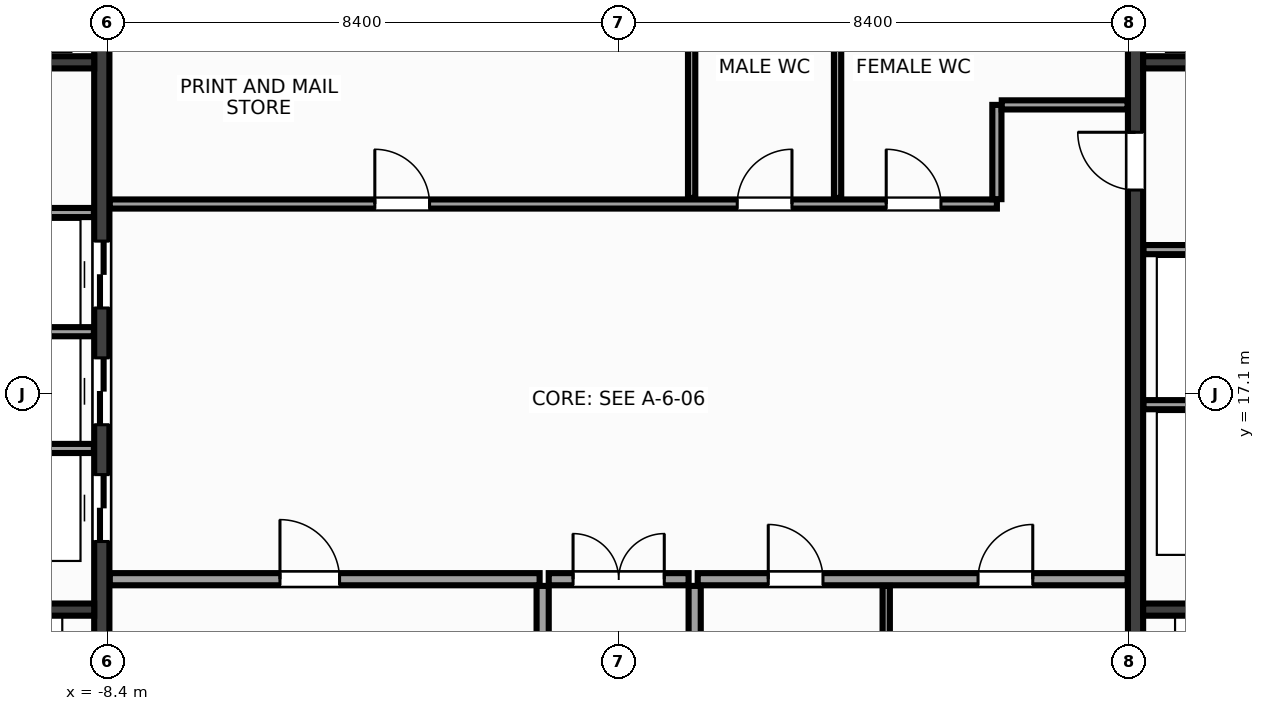
"""IFC4 building model, lengths in metres.
Left out: names, types, materials, properties, quantities, classifications, styles, units other than length and angle.
Written with IfcOpenShell. Run it as: python <this file> out.ifc"""

import sys

from ifc_helpers import new_model, si_unit, direction, frame, frame_2d, origin, place, context, subcontext, project, spatial, rectangle, extrude, source, transform, mapped, element, fill, save


model = new_model("IFC4")
c1 = context("Model", 3, precision=1e-05, world=origin(), true_north=direction((0.0, 1.0)))
c2 = subcontext(c1, "Body", "Model", "MODEL_VIEW")
j1 = project(units=[si_unit("LENGTHUNIT", "METRE"), si_unit("PLANEANGLEUNIT", "RADIAN")], contexts=[c1])
p1 = place(None, origin())
s1 = spatial("IfcSite", under=j1, at=p1, CompositionType="ELEMENT")
p2 = place(p1, origin())
s2 = spatial("IfcBuilding", under=s1, at=p2, CompositionType="ELEMENT")
p3 = place(p2, frame((0.0, 0.0, 243.2)))
s3 = spatial("IfcBuildingStorey", under=s2, at=p3, CompositionType="ELEMENT", Elevation=243.2)
m1 = source(origin(), c2, "Body", "SweptSolid", [
    extrude(rectangle(XDim=13.1, YDim=0.25, at=frame_2d((6.55, 0.0))), origin(), (0.0, 0.0, 1.0), 3.6),
])
p4 = place(p3, frame((-8.5, 10.45, 0.0), z_axis=(0.0, 0.0, 1.0), x_axis=(0.0, 1.0, 0.0)))
e1 = element("IfcWall", 1, at=p4, inside=s3, PredefinedType="SHEAR", context=c2, shape_type="MappedRepresentation", body=[
    mapped(m1, transform((0.0, 0.0, 0.0), x_axis=(1.0, 0.0, 0.0), y_axis=(0.0, 1.0, 0.0), z_axis=(0.0, 0.0, 1.0), scale=1.0)),
])
p5 = place(p4, frame((4.22, 0.0, 0.0)))
e2 = element("IfcOpeningElement", 2, at=p5, cuts=e1, PredefinedType="OPENING", context=c2, shape_type="SweptSolid", body=[
    extrude(rectangle(XDim=1.1, YDim=2.15, at=frame_2d((0.55, 1.075))), frame((0.0, 0.137, 0.0), z_axis=(0.0, -1.0, 0.0), x_axis=(1.0, 0.0, 0.0)), (0.0, 0.0, 1.0), 0.274),
])
p6 = place(p4, frame((6.14, 0.0, 0.0)))
e3 = element("IfcOpeningElement", 3, at=p6, cuts=e1, PredefinedType="OPENING", context=c2, shape_type="SweptSolid", body=[
    extrude(rectangle(XDim=1.1, YDim=2.15, at=frame_2d((0.55, 1.075))), frame((0.0, 0.137, 0.0), z_axis=(0.0, -1.0, 0.0), x_axis=(1.0, 0.0, 0.0)), (0.0, 0.0, 1.0), 0.274),
])
p7 = place(p4, frame((8.06, 0.0, 0.0)))
e4 = element("IfcOpeningElement", 4, at=p7, cuts=e1, PredefinedType="OPENING", context=c2, shape_type="SweptSolid", body=[
    extrude(rectangle(XDim=1.1, YDim=2.15, at=frame_2d((0.55, 1.075))), frame((0.0, 0.137, 0.0), z_axis=(0.0, -1.0, 0.0), x_axis=(1.0, 0.0, 0.0)), (0.0, 0.0, 1.0), 0.274),
])
p8 = place(p3, frame((8.5, 10.45, 0.0), z_axis=(0.0, 0.0, 1.0), x_axis=(0.0, 1.0, 0.0)))
e5 = element("IfcWall", 5, at=p8, inside=s3, PredefinedType="SHEAR", context=c2, shape_type="MappedRepresentation", body=[
    mapped(m1, transform((0.0, 0.0, 0.0), x_axis=(1.0, 0.0, 0.0), y_axis=(0.0, 1.0, 0.0), z_axis=(0.0, 0.0, 1.0), scale=1.0)),
])
p9 = place(p8, frame((10.0, 0.0, 0.0)))
e6 = element("IfcOpeningElement", 6, at=p9, cuts=e5, PredefinedType="OPENING", context=c2, shape_type="SweptSolid", body=[
    extrude(rectangle(XDim=0.95, YDim=2.15, at=frame_2d((0.475, 1.075))), frame((0.0, 0.137, 0.0), z_axis=(0.0, -1.0, 0.0), x_axis=(1.0, 0.0, 0.0)), (0.0, 0.0, 1.0), 0.274),
])
m2 = source(origin(), c2, "Body", "SweptSolid", [
    extrude(rectangle(XDim=2.825, YDim=0.2, at=frame_2d((1.413, 0.0))), origin(), (0.0, 0.0, 1.0), 3.6),
])
for number, where, z_axis, x_axis in (
    (7, (-11.45, 13.55, 0.0), (0.0, 0.0, 1.0), (1.0, 0.0, 0.0)),
    (8, (8.625, 13.55, 0.0), (0.0, 0.0, 1.0), (1.0, 0.0, 0.0)),
):
    element("IfcWall", number, at=place(p3, frame(where, z_axis=z_axis, x_axis=x_axis)), inside=s3, PredefinedType="SHEAR", context=c2, shape_type="MappedRepresentation", body=[
        mapped(m2, transform((0.0, 0.0, 0.0), x_axis=(1.0, 0.0, 0.0), y_axis=(0.0, 1.0, 0.0), z_axis=(0.0, 0.0, 1.0), scale=1.0)),
    ])
m3 = source(origin(), c2, "Body", "SweptSolid", [
    extrude(rectangle(XDim=3.02, YDim=0.2, at=frame_2d((1.51, 0.0))), origin(), (0.0, 0.0, 1.0), 3.6),
])
for number, where, z_axis, x_axis in (
    (9, (-11.645, 22.55, 0.0), (0.0, 0.0, 1.0), (1.0, 0.0, 0.0)),
    (10, (8.625, 22.55, 0.0), (0.0, 0.0, 1.0), (1.0, 0.0, 0.0)),
):
    element("IfcWall", number, at=place(p3, frame(where, z_axis=z_axis, x_axis=x_axis)), inside=s3, PredefinedType="SHEAR", context=c2, shape_type="MappedRepresentation", body=[
        mapped(m3, transform((0.0, 0.0, 0.0), x_axis=(1.0, 0.0, 0.0), y_axis=(0.0, 1.0, 0.0), z_axis=(0.0, 0.0, 1.0), scale=1.0)),
    ])
m4 = source(origin(), c2, "Body", "SweptSolid", [
    extrude(rectangle(XDim=3.01, YDim=0.15, at=frame_2d((1.505, 0.0))), origin(), (0.0, 0.0, 1.0), 3.37),
])
for number, where, z_axis, x_axis in (
    (11, (-11.64, 16.2, 0.0), (0.0, 0.0, 1.0), (1.0, 0.0, 0.0)),
    (12, (-11.64, 18.12, 0.0), (0.0, 0.0, 1.0), (1.0, 0.0, 0.0)),
    (13, (-11.64, 20.08, 0.0), (0.0, 0.0, 1.0), (1.0, 0.0, 0.0)),
    (14, (8.63, 16.92, 0.0), (0.0, 0.0, 1.0), (1.0, 0.0, 0.0)),
    (15, (8.63, 19.47, 0.0), (0.0, 0.0, 1.0), (1.0, 0.0, 0.0)),
):
    element("IfcWall", number, at=place(p3, frame(where, z_axis=z_axis, x_axis=x_axis)), inside=s3, PredefinedType="PARTITIONING", context=c2, shape_type="MappedRepresentation", body=[
        mapped(m4, transform((0.0, 0.0, 0.0), x_axis=(1.0, 0.0, 0.0), y_axis=(0.0, 1.0, 0.0), z_axis=(0.0, 0.0, 1.0), scale=1.0)),
    ])
m5 = source(origin(), c2, "Body", "SweptSolid", [
    extrude(rectangle(XDim=7.07, YDim=0.2, at=frame_2d((3.535, 0.0))), origin(), (0.0, 0.0, 1.0), 3.37),
])
p10 = place(p3, frame((-8.37, 14.05, 0.0), z_axis=(0.0, 0.0, 1.0), x_axis=(1.0, 0.0, 0.0)))
e16 = element("IfcWall", 16, at=p10, inside=s3, PredefinedType="PARTITIONING", context=c2, shape_type="MappedRepresentation", body=[
    mapped(m5, transform((0.0, 0.0, 0.0), x_axis=(1.0, 0.0, 0.0), y_axis=(0.0, 1.0, 0.0), z_axis=(0.0, 0.0, 1.0), scale=1.0)),
])
p11 = place(p10, frame((2.8, 0.0, 0.0)))
e17 = element("IfcOpeningElement", 17, at=p11, cuts=e16, PredefinedType="OPENING", context=c2, shape_type="SweptSolid", body=[
    extrude(rectangle(XDim=0.98, YDim=2.15, at=frame_2d((0.49, 1.075))), frame((0.0, 0.112, 0.0), z_axis=(0.0, -1.0, 0.0), x_axis=(1.0, 0.0, 0.0)), (0.0, 0.0, 1.0), 0.224),
])
p12 = place(p3, frame((1.3, 14.05, 0.0), z_axis=(0.0, 0.0, 1.0), x_axis=(1.0, 0.0, 0.0)))
e18 = element("IfcWall", 18, at=p12, inside=s3, PredefinedType="PARTITIONING", context=c2, shape_type="MappedRepresentation", body=[
    mapped(m5, transform((0.0, 0.0, 0.0), x_axis=(1.0, 0.0, 0.0), y_axis=(0.0, 1.0, 0.0), z_axis=(0.0, 0.0, 1.0), scale=1.0)),
])
p13 = place(p12, frame((1.16, 0.0, 0.0)))
e19 = element("IfcOpeningElement", 19, at=p13, cuts=e18, PredefinedType="OPENING", context=c2, shape_type="SweptSolid", body=[
    extrude(rectangle(XDim=0.9, YDim=2.15, at=frame_2d((0.45, 1.075))), frame((0.0, 0.112, 0.0), z_axis=(0.0, -1.0, 0.0), x_axis=(1.0, 0.0, 0.0)), (0.0, 0.0, 1.0), 0.224),
])
p14 = place(p12, frame((4.61, 0.0, 0.0)))
e20 = element("IfcOpeningElement", 20, at=p14, cuts=e18, PredefinedType="OPENING", context=c2, shape_type="SweptSolid", body=[
    extrude(rectangle(XDim=0.9, YDim=2.15, at=frame_2d((0.45, 1.075))), frame((0.0, 0.112, 0.0), z_axis=(0.0, -1.0, 0.0), x_axis=(1.0, 0.0, 0.0)), (0.0, 0.0, 1.0), 0.224),
])
m6 = source(origin(), c2, "Body", "SweptSolid", [
    extrude(rectangle(XDim=3.49, YDim=0.2, at=frame_2d((1.745, 0.0))), origin(), (0.0, 0.0, 1.0), 3.37),
])
for number, where, z_axis, x_axis in (
    (21, (-1.25, 10.45, 0.0), (0.0, 0.0, 1.0), (0.0, 1.0, 0.0)),
    (22, (1.25, 10.45, 0.0), (0.0, 0.0, 1.0), (0.0, 1.0, 0.0)),
):
    element("IfcWall", number, at=place(p3, frame(where, z_axis=z_axis, x_axis=x_axis)), inside=s3, PredefinedType="PARTITIONING", context=c2, shape_type="MappedRepresentation", body=[
        mapped(m6, transform((0.0, 0.0, 0.0), x_axis=(1.0, 0.0, 0.0), y_axis=(0.0, 1.0, 0.0), z_axis=(0.0, 0.0, 1.0), scale=1.0)),
    ])
m7 = source(origin(), c2, "Body", "SweptSolid", [
    extrude(rectangle(XDim=2.3, YDim=0.2, at=frame_2d((1.15, 0.0))), origin(), (0.0, 0.0, 1.0), 3.37),
])
p15 = place(p3, frame((-1.15, 14.05, 0.0), z_axis=(0.0, 0.0, 1.0), x_axis=(1.0, 0.0, 0.0)))
e23 = element("IfcWall", 23, at=p15, inside=s3, PredefinedType="PARTITIONING", context=c2, shape_type="MappedRepresentation", body=[
    mapped(m7, transform((0.0, 0.0, 0.0), x_axis=(1.0, 0.0, 0.0), y_axis=(0.0, 1.0, 0.0), z_axis=(0.0, 0.0, 1.0), scale=1.0)),
])
p16 = place(p15, frame((0.4, 0.0, 0.0)))
e24 = element("IfcOpeningElement", 24, at=p16, cuts=e23, PredefinedType="OPENING", context=c2, shape_type="SweptSolid", body=[
    extrude(rectangle(XDim=1.5, YDim=2.2, at=frame_2d((0.75, 1.1))), frame((0.0, 0.112, 0.0), z_axis=(0.0, -1.0, 0.0), x_axis=(1.0, 0.0, 0.0)), (0.0, 0.0, 1.0), 0.224),
])
m8 = source(origin(), c2, "Body", "SweptSolid", [
    extrude(rectangle(XDim=14.59, YDim=0.15, at=frame_2d((7.295, 0.0))), origin(), (0.0, 0.0, 1.0), 3.37),
])
p17 = place(p3, frame((-8.37, 20.22, 0.0), z_axis=(0.0, 0.0, 1.0), x_axis=(1.0, 0.0, 0.0)))
e25 = element("IfcWall", 25, at=p17, inside=s3, PredefinedType="PARTITIONING", context=c2, shape_type="MappedRepresentation", body=[
    mapped(m8, transform((0.0, 0.0, 0.0), x_axis=(1.0, 0.0, 0.0), y_axis=(0.0, 1.0, 0.0), z_axis=(0.0, 0.0, 1.0), scale=1.0)),
])
p18 = place(p17, frame((4.36, 0.0, 0.0)))
e26 = element("IfcOpeningElement", 26, at=p18, cuts=e25, PredefinedType="OPENING", context=c2, shape_type="SweptSolid", body=[
    extrude(rectangle(XDim=0.9, YDim=2.15, at=frame_2d((0.45, 1.075))), frame((0.0, 0.087, 0.0), z_axis=(0.0, -1.0, 0.0), x_axis=(1.0, 0.0, 0.0)), (0.0, 0.0, 1.0), 0.174),
])
p19 = place(p17, frame((10.32, 0.0, 0.0)))
e27 = element("IfcOpeningElement", 27, at=p19, cuts=e25, PredefinedType="OPENING", context=c2, shape_type="SweptSolid", body=[
    extrude(rectangle(XDim=0.9, YDim=2.15, at=frame_2d((0.45, 1.075))), frame((0.0, 0.087, 0.0), z_axis=(0.0, -1.0, 0.0), x_axis=(1.0, 0.0, 0.0)), (0.0, 0.0, 1.0), 0.174),
])
p20 = place(p17, frame((12.77, 0.0, 0.0)))
e28 = element("IfcOpeningElement", 28, at=p20, cuts=e25, PredefinedType="OPENING", context=c2, shape_type="SweptSolid", body=[
    extrude(rectangle(XDim=0.9, YDim=2.15, at=frame_2d((0.45, 1.075))), frame((0.0, 0.087, 0.0), z_axis=(0.0, -1.0, 0.0), x_axis=(1.0, 0.0, 0.0)), (0.0, 0.0, 1.0), 0.174),
])
m9 = source(origin(), c2, "Body", "SweptSolid", [
    extrude(rectangle(XDim=1.55, YDim=0.15, at=frame_2d((0.775, 0.0))), origin(), (0.0, 0.0, 1.0), 3.37),
])
p21 = place(p3, frame((6.22, 20.3, 0.0), z_axis=(0.0, 0.0, 1.0), x_axis=(0.0, 1.0, 0.0)))
e29 = element("IfcWall", 29, at=p21, inside=s3, PredefinedType="PARTITIONING", context=c2, shape_type="MappedRepresentation", body=[
    mapped(m9, transform((0.0, 0.0, 0.0), x_axis=(1.0, 0.0, 0.0), y_axis=(0.0, 1.0, 0.0), z_axis=(0.0, 0.0, 1.0), scale=1.0)),
])
m10 = source(origin(), c2, "Body", "SweptSolid", [
    extrude(rectangle(XDim=2.07, YDim=0.15, at=frame_2d((1.035, 0.0))), origin(), (0.0, 0.0, 1.0), 3.37),
])
p22 = place(p3, frame((6.3, 21.85, 0.0), z_axis=(0.0, 0.0, 1.0), x_axis=(1.0, 0.0, 0.0)))
e30 = element("IfcWall", 30, at=p22, inside=s3, PredefinedType="PARTITIONING", context=c2, shape_type="MappedRepresentation", body=[
    mapped(m10, transform((0.0, 0.0, 0.0), x_axis=(1.0, 0.0, 0.0), y_axis=(0.0, 1.0, 0.0), z_axis=(0.0, 0.0, 1.0), scale=1.0)),
])
m11 = source(origin(), c2, "Body", "SweptSolid", [
    extrude(rectangle(XDim=3.49, YDim=0.12, at=frame_2d((1.745, 0.0))), origin(), (0.0, 0.0, 1.0), 3.37),
])
p23 = place(p3, frame((4.4, 10.45, 0.0), z_axis=(0.0, 0.0, 1.0), x_axis=(0.0, 1.0, 0.0)))
e31 = element("IfcWall", 31, at=p23, inside=s3, PredefinedType="PARTITIONING", context=c2, shape_type="MappedRepresentation", body=[
    mapped(m11, transform((0.0, 0.0, 0.0), x_axis=(1.0, 0.0, 0.0), y_axis=(0.0, 1.0, 0.0), z_axis=(0.0, 0.0, 1.0), scale=1.0)),
])
m12 = source(origin(), c2, "Body", "SweptSolid", [
    extrude(rectangle(XDim=3.19, YDim=0.12, at=frame_2d((1.595, 0.0))), origin(), (0.0, 0.0, 1.0), 3.37),
])
for number, where, z_axis, x_axis in (
    (32, (1.2, 20.32, 0.0), (0.0, 0.0, 1.0), (0.0, 1.0, 0.0)),
    (33, (3.6, 20.32, 0.0), (0.0, 0.0, 1.0), (0.0, 1.0, 0.0)),
):
    element("IfcWall", number, at=place(p3, frame(where, z_axis=z_axis, x_axis=x_axis)), inside=s3, PredefinedType="PARTITIONING", context=c2, shape_type="MappedRepresentation", body=[
        mapped(m12, transform((0.0, 0.0, 0.0), x_axis=(1.0, 0.0, 0.0), y_axis=(0.0, 1.0, 0.0), z_axis=(0.0, 0.0, 1.0), scale=1.0)),
    ])
m13 = source(origin(), c2, "Body", "SweptSolid", [
    extrude(rectangle(XDim=1.1, YDim=2.15, at=frame_2d((0.55, 1.075))), frame((0.0, 0.025, 0.0), z_axis=(0.0, -1.0, 0.0), x_axis=(1.0, 0.0, 0.0)), (0.0, 0.0, 1.0), 0.05),
])
p24 = place(p5, origin())
e34 = element("IfcDoor", 34, at=p24, inside=s3, OperationType="DOUBLE_DOOR_SLIDING", PredefinedType="DOOR", context=c2, shape_type="MappedRepresentation", body=[
    mapped(m13, transform((0.0, 0.0, 0.0), x_axis=(1.0, 0.0, 0.0), y_axis=(0.0, 1.0, 0.0), z_axis=(0.0, 0.0, 1.0), scale=1.0)),
])
fill(e2, e34)
p25 = place(p6, origin())
e35 = element("IfcDoor", 35, at=p25, inside=s3, OperationType="DOUBLE_DOOR_SLIDING", PredefinedType="DOOR", context=c2, shape_type="MappedRepresentation", body=[
    mapped(m13, transform((0.0, 0.0, 0.0), x_axis=(1.0, 0.0, 0.0), y_axis=(0.0, 1.0, 0.0), z_axis=(0.0, 0.0, 1.0), scale=1.0)),
])
fill(e3, e35)
p26 = place(p7, origin())
e36 = element("IfcDoor", 36, at=p26, inside=s3, OperationType="DOUBLE_DOOR_SLIDING", PredefinedType="DOOR", context=c2, shape_type="MappedRepresentation", body=[
    mapped(m13, transform((0.0, 0.0, 0.0), x_axis=(1.0, 0.0, 0.0), y_axis=(0.0, 1.0, 0.0), z_axis=(0.0, 0.0, 1.0), scale=1.0)),
])
fill(e4, e36)
m14 = source(origin(), c2, "Body", "SweptSolid", [
    extrude(rectangle(XDim=0.95, YDim=2.15, at=frame_2d((0.475, 1.075))), frame((0.0, 0.025, 0.0), z_axis=(0.0, -1.0, 0.0), x_axis=(1.0, 0.0, 0.0)), (0.0, 0.0, 1.0), 0.05),
])
p27 = place(p9, origin())
e37 = element("IfcDoor", 37, at=p27, inside=s3, OperationType="SINGLE_SWING_RIGHT", PredefinedType="DOOR", context=c2, shape_type="MappedRepresentation", body=[
    mapped(m14, transform((0.0, 0.0, 0.0), x_axis=(1.0, 0.0, 0.0), y_axis=(0.0, 1.0, 0.0), z_axis=(0.0, 0.0, 1.0), scale=1.0)),
])
fill(e6, e37)
m15 = source(origin(), c2, "Body", "SweptSolid", [
    extrude(rectangle(XDim=0.98, YDim=2.15, at=frame_2d((0.49, 1.075))), frame((0.0, 0.025, 0.0), z_axis=(0.0, -1.0, 0.0), x_axis=(1.0, 0.0, 0.0)), (0.0, 0.0, 1.0), 0.05),
])
p28 = place(p11, origin())
e38 = element("IfcDoor", 38, at=p28, inside=s3, OperationType="SINGLE_SWING_LEFT", PredefinedType="DOOR", context=c2, shape_type="MappedRepresentation", body=[
    mapped(m15, transform((0.0, 0.0, 0.0), x_axis=(1.0, 0.0, 0.0), y_axis=(0.0, 1.0, 0.0), z_axis=(0.0, 0.0, 1.0), scale=1.0)),
])
fill(e17, e38)
m16 = source(origin(), c2, "Body", "SweptSolid", [
    extrude(rectangle(XDim=0.9, YDim=2.15, at=frame_2d((0.45, 1.075))), frame((0.0, 0.025, 0.0), z_axis=(0.0, -1.0, 0.0), x_axis=(1.0, 0.0, 0.0)), (0.0, 0.0, 1.0), 0.05),
])
p29 = place(p13, origin())
e39 = element("IfcDoor", 39, at=p29, inside=s3, OperationType="SINGLE_SWING_LEFT", PredefinedType="DOOR", context=c2, shape_type="MappedRepresentation", body=[
    mapped(m16, transform((0.0, 0.0, 0.0), x_axis=(1.0, 0.0, 0.0), y_axis=(0.0, 1.0, 0.0), z_axis=(0.0, 0.0, 1.0), scale=1.0)),
])
fill(e19, e39)
p30 = place(p14, origin())
e40 = element("IfcDoor", 40, at=p30, inside=s3, OperationType="SINGLE_SWING_RIGHT", PredefinedType="DOOR", context=c2, shape_type="MappedRepresentation", body=[
    mapped(m16, transform((0.0, 0.0, 0.0), x_axis=(1.0, 0.0, 0.0), y_axis=(0.0, 1.0, 0.0), z_axis=(0.0, 0.0, 1.0), scale=1.0)),
])
fill(e20, e40)
m17 = source(origin(), c2, "Body", "SweptSolid", [
    extrude(rectangle(XDim=1.5, YDim=2.2, at=frame_2d((0.75, 1.1))), frame((0.0, 0.025, 0.0), z_axis=(0.0, -1.0, 0.0), x_axis=(1.0, 0.0, 0.0)), (0.0, 0.0, 1.0), 0.05),
])
p31 = place(p16, origin())
e41 = element("IfcDoor", 41, at=p31, inside=s3, OperationType="DOUBLE_DOOR_SINGLE_SWING", PredefinedType="DOOR", context=c2, shape_type="MappedRepresentation", body=[
    mapped(m17, transform((0.0, 0.0, 0.0), x_axis=(1.0, 0.0, 0.0), y_axis=(0.0, 1.0, 0.0), z_axis=(0.0, 0.0, 1.0), scale=1.0)),
])
fill(e24, e41)
p32 = place(p18, origin())
e42 = element("IfcDoor", 42, at=p32, inside=s3, OperationType="SINGLE_SWING_LEFT", PredefinedType="DOOR", context=c2, shape_type="MappedRepresentation", body=[
    mapped(m16, transform((0.0, 0.0, 0.0), x_axis=(1.0, 0.0, 0.0), y_axis=(0.0, 1.0, 0.0), z_axis=(0.0, 0.0, 1.0), scale=1.0)),
])
fill(e26, e42)
p33 = place(p19, origin())
e43 = element("IfcDoor", 43, at=p33, inside=s3, OperationType="SINGLE_SWING_RIGHT", PredefinedType="DOOR", context=c2, shape_type="MappedRepresentation", body=[
    mapped(m16, transform((0.0, 0.0, 0.0), x_axis=(1.0, 0.0, 0.0), y_axis=(0.0, 1.0, 0.0), z_axis=(0.0, 0.0, 1.0), scale=1.0)),
])
fill(e27, e43)
p34 = place(p20, origin())
e44 = element("IfcDoor", 44, at=p34, inside=s3, OperationType="SINGLE_SWING_LEFT", PredefinedType="DOOR", context=c2, shape_type="MappedRepresentation", body=[
    mapped(m16, transform((0.0, 0.0, 0.0), x_axis=(1.0, 0.0, 0.0), y_axis=(0.0, 1.0, 0.0), z_axis=(0.0, 0.0, 1.0), scale=1.0)),
])
fill(e28, e44)
save(model, sys.argv[1])
